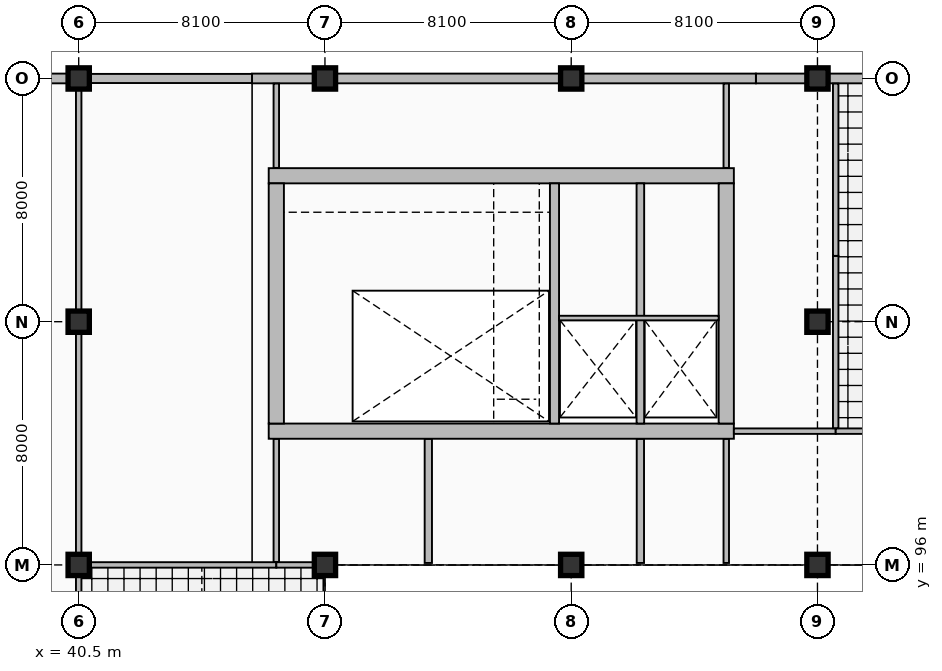
"""IFC4 building model, lengths in metres.
Left out: names, types, materials, properties, quantities, classifications, styles, units other than length and angle.
Written with IfcOpenShell. Run it as: python <this file> out.ifc"""

import sys

from ifc_helpers import new_model, si_unit, direction, frame, frame_2d, origin, origin_2d, place, context, subcontext, project, spatial, rectangle, extrude, element, fill, save


model = new_model("IFC4")
c1 = context("Model", 3, precision=1e-05, world=origin(), true_north=direction((0.0, 1.0)))
c2 = subcontext(c1, "Body", "Model", "MODEL_VIEW")
j1 = project(units=[si_unit("LENGTHUNIT", "METRE"), si_unit("PLANEANGLEUNIT", "RADIAN")], contexts=[c1])
p1 = place(None, origin())
s1 = spatial("IfcSite", under=j1, at=p1, CompositionType="ELEMENT")
p2 = place(p1, origin())
s2 = spatial("IfcBuilding", under=s1, at=p2, CompositionType="ELEMENT")
p3 = place(p2, frame((0.0, 0.0, 10.2)))
s3 = spatial("IfcBuildingStorey", under=s2, at=p3, CompositionType="ELEMENT", Elevation=10.2)
p4 = place(p3, frame((46.75, 100.4, 0.0), z_axis=(0.0, 0.0, 1.0), x_axis=(1.0, 0.0, 0.0)))
e1 = element("IfcWall", 1, at=p4, inside=s3, PredefinedType="SHEAR", context=c2, shape_type="SweptSolid", body=[
    extrude(rectangle(XDim=15.3, YDim=0.5, at=frame_2d((7.65, 0.0))), origin(), (0.0, 0.0, 1.0), 4.5),
])
p5 = place(p4, frame((1.0, 0.0, 0.0)))
e2 = element("IfcOpeningElement", 2, at=p5, cuts=e1, PredefinedType="OPENING", context=c2, shape_type="SweptSolid", body=[
    extrude(rectangle(XDim=1.15, YDim=2.25, at=frame_2d((0.575, 1.125))), frame((0.0, 0.26, 0.0), z_axis=(0.0, -1.0, 0.0), x_axis=(1.0, 0.0, 0.0)), (0.0, 0.0, 1.0), 0.52),
])
p6 = place(p4, frame((10.282, 0.0, 0.0)))
e3 = element("IfcOpeningElement", 3, at=p6, cuts=e1, PredefinedType="OPENING", context=c2, shape_type="SweptSolid", body=[
    extrude(rectangle(XDim=1.1, YDim=2.2, at=frame_2d((0.55, 1.1))), frame((0.0, 0.26, 0.0), z_axis=(0.0, -1.0, 0.0), x_axis=(1.0, 0.0, 0.0)), (0.0, 0.0, 1.0), 0.52),
])
p7 = place(p4, frame((12.998, 0.0, 0.0)))
e4 = element("IfcOpeningElement", 4, at=p7, cuts=e1, PredefinedType="OPENING", context=c2, shape_type="SweptSolid", body=[
    extrude(rectangle(XDim=1.1, YDim=2.2, at=frame_2d((0.55, 1.1))), frame((0.0, 0.26, 0.0), z_axis=(0.0, -1.0, 0.0), x_axis=(1.0, 0.0, 0.0)), (0.0, 0.0, 1.0), 0.52),
])
p8 = place(p3, frame((46.75, 108.8, 0.0), z_axis=(0.0, 0.0, 1.0), x_axis=(1.0, 0.0, 0.0)))
e5 = element("IfcWall", 5, at=p8, inside=s3, PredefinedType="SHEAR", context=c2, shape_type="SweptSolid", body=[
    extrude(rectangle(XDim=15.3, YDim=0.5, at=frame_2d((7.65, 0.0))), origin(), (0.0, 0.0, 1.0), 4.5),
])
for number, where, z_axis, x_axis in (
    (6, (47.0, 100.65, 0.0), (0.0, 0.0, 1.0), (0.0, 1.0, 0.0)),
    (7, (61.8, 100.65, 0.0), (0.0, 0.0, 1.0), (0.0, 1.0, 0.0)),
):
    element("IfcWall", number, at=place(p3, frame(where, z_axis=z_axis, x_axis=x_axis)), inside=s3, PredefinedType="SHEAR", context=c2, shape_type="SweptSolid", body=[
        extrude(rectangle(XDim=7.9, YDim=0.5, at=frame_2d((3.95, 0.0))), origin(), (0.0, 0.0, 1.0), 4.5),
    ])
p9 = place(p3, frame((56.15, 100.65, 0.0), z_axis=(0.0, 0.0, 1.0), x_axis=(0.0, 1.0, 0.0)))
e8 = element("IfcWall", 8, at=p9, inside=s3, PredefinedType="SHEAR", context=c2, shape_type="SweptSolid", body=[
    extrude(rectangle(XDim=7.9, YDim=0.3, at=frame_2d((3.95, 0.0))), origin(), (0.0, 0.0, 1.0), 4.5),
])
p10 = place(p3, frame((58.975, 100.65, 0.0), z_axis=(0.0, 0.0, 1.0), x_axis=(0.0, 1.0, 0.0)))
e9 = element("IfcWall", 9, at=p10, inside=s3, PredefinedType="SHEAR", context=c2, shape_type="SweptSolid", body=[
    extrude(rectangle(XDim=7.9, YDim=0.25, at=frame_2d((3.95, 0.0))), origin(), (0.0, 0.0, 1.0), 4.5),
])
for number, where, z_axis, x_axis in (
    (10, (40.5, 96.0, 0.0), (0.0, 0.0, 1.0), (1.0, 0.0, 0.0)),
    (11, (40.5, 104.0, 0.0), (0.0, 0.0, 1.0), (1.0, 0.0, 0.0)),
    (12, (40.5, 112.0, 0.0), (0.0, 0.0, 1.0), (1.0, 0.0, 0.0)),
    (13, (48.6, 96.0, 0.0), (0.0, 0.0, 1.0), (1.0, 0.0, 0.0)),
    (14, (48.6, 112.0, 0.0), (0.0, 0.0, 1.0), (1.0, 0.0, 0.0)),
    (15, (56.7, 96.0, 0.0), (0.0, 0.0, 1.0), (1.0, 0.0, 0.0)),
    (16, (56.7, 112.0, 0.0), (0.0, 0.0, 1.0), (1.0, 0.0, 0.0)),
    (17, (64.8, 96.0, 0.0), (0.0, 0.0, 1.0), (1.0, 0.0, 0.0)),
    (18, (64.8, 104.0, 0.0), (0.0, 0.0, 1.0), (1.0, 0.0, 0.0)),
    (19, (64.8, 112.0, 0.0), (0.0, 0.0, 1.0), (1.0, 0.0, 0.0)),
):
    element("IfcColumn", number, at=place(p3, frame(where, z_axis=z_axis, x_axis=x_axis)), inside=s3, PredefinedType="COLUMN", context=c2, shape_type="SweptSolid", body=[
        extrude(rectangle(XDim=0.7, YDim=0.7, at=origin_2d()), origin(), (0.0, 0.0, 1.0), 4.5),
    ])
p11 = place(p3, frame((76.95, 112.0, 0.0), z_axis=(0.0, 0.0, 1.0), x_axis=(-1.0, 0.0, 0.0)))
e20 = element("IfcWall", 20, at=p11, inside=s3, PredefinedType="SOLIDWALL", context=c2, shape_type="SweptSolid", body=[
    extrude(rectangle(XDim=14.175, YDim=0.32, at=frame_2d((7.087, 0.0))), origin(), (0.0, 0.0, 1.0), 3.632),
])
p12 = place(p11, frame((6.75, 0.0, 0.85)))
e21 = element("IfcOpeningElement", 21, at=p12, cuts=e20, PredefinedType="OPENING", context=c2, shape_type="SweptSolid", body=[
    extrude(rectangle(XDim=0.9, YDim=2.4, at=frame_2d((0.45, 1.2))), frame((0.0, 0.17, 0.0), z_axis=(0.0, -1.0, 0.0), x_axis=(1.0, 0.0, 0.0)), (0.0, 0.0, 1.0), 0.34),
])
p13 = place(p3, frame((62.775, 112.0, 0.0), z_axis=(0.0, 0.0, 1.0), x_axis=(-1.0, 0.0, 0.0)))
e22 = element("IfcWall", 22, at=p13, inside=s3, PredefinedType="SOLIDWALL", context=c2, shape_type="SweptSolid", body=[
    extrude(rectangle(XDim=14.175, YDim=0.32, at=frame_2d((7.087, 0.0))), origin(), (0.0, 0.0, 1.0), 3.632),
])
p14 = place(p13, frame((8.55, 0.0, 0.95)))
e23 = element("IfcOpeningElement", 23, at=p14, cuts=e22, PredefinedType="OPENING", context=c2, shape_type="SweptSolid", body=[
    extrude(rectangle(XDim=1.2, YDim=1.8, at=frame_2d((0.6, 0.9))), frame((0.0, 0.17, 0.0), z_axis=(0.0, -1.0, 0.0), x_axis=(1.0, 0.0, 0.0)), (0.0, 0.0, 1.0), 0.34),
])
p15 = place(p3, frame((48.6, 112.0, 0.0), z_axis=(0.0, 0.0, 1.0), x_axis=(-1.0, 0.0, 0.0)))
e24 = element("IfcWall", 24, at=p15, inside=s3, PredefinedType="SOLIDWALL", context=c2, shape_type="SweptSolid", body=[
    extrude(rectangle(XDim=2.4, YDim=0.32, at=frame_2d((1.2, 0.0))), origin(), (0.0, 0.0, 1.0), 3.699),
])
p16 = place(p3, frame((46.2, 112.0, 0.0), z_axis=(0.0, 0.0, 1.0), x_axis=(-1.0, 0.0, 0.0)))
e25 = element("IfcWall", 25, at=p16, inside=s3, PredefinedType="SOLIDWALL", context=c2, shape_type="SweptSolid", body=[
    extrude(rectangle(XDim=5.7, YDim=0.3, at=frame_2d((2.85, 0.0))), origin(), (0.0, 0.0, 1.0), 3.699),
])
p17 = place(p16, frame((2.25, 0.0, 0.95)))
e26 = element("IfcOpeningElement", 26, at=p17, cuts=e25, PredefinedType="OPENING", context=c2, shape_type="SweptSolid", body=[
    extrude(rectangle(XDim=1.35, YDim=1.8, at=frame_2d((0.675, 0.9))), frame((0.0, 0.16, 0.0), z_axis=(0.0, -1.0, 0.0), x_axis=(1.0, 0.0, 0.0)), (0.0, 0.0, 1.0), 0.32),
])
p18 = place(p3, frame((40.5, 112.0, 0.0), z_axis=(0.0, 0.0, 1.0), x_axis=(-1.0, 0.0, 0.0)))
e27 = element("IfcWall", 27, at=p18, inside=s3, PredefinedType="SOLIDWALL", context=c2, shape_type="SweptSolid", body=[
    extrude(rectangle(XDim=12.15, YDim=0.32, at=frame_2d((6.075, 0.0))), origin(), (0.0, 0.0, 1.0), 3.632),
])
p19 = place(p18, frame((5.4, 0.0, 0.85)))
e28 = element("IfcOpeningElement", 28, at=p19, cuts=e27, PredefinedType="OPENING", context=c2, shape_type="SweptSolid", body=[
    extrude(rectangle(XDim=1.35, YDim=2.1, at=frame_2d((0.675, 1.05))), frame((0.0, 0.17, 0.0), z_axis=(0.0, -1.0, 0.0), x_axis=(1.0, 0.0, 0.0)), (0.0, 0.0, 1.0), 0.34),
])
p20 = place(p3, frame((56.3, 104.12, 0.0), z_axis=(0.0, 0.0, 1.0), x_axis=(1.0, 0.0, 0.0)))
e29 = element("IfcWall", 29, at=p20, inside=s3, PredefinedType="PARTITIONING", context=c2, shape_type="SweptSolid", body=[
    extrude(rectangle(XDim=5.25, YDim=0.15, at=frame_2d((2.625, 0.0))), origin(), (0.0, 0.0, 1.0), 4.24),
])
p21 = place(p3, frame((40.858, 96.0, 0.0), z_axis=(0.0, 0.0, 1.0), x_axis=(1.0, 0.0, 0.0)))
e30 = element("IfcWall", 30, at=p21, inside=s3, PredefinedType="PARTITIONING", context=c2, shape_type="SweptSolid", body=[
    extrude(rectangle(XDim=6.142, YDim=0.18, at=frame_2d((3.071, 0.0))), origin(), (0.0, 0.0, 1.0), 3.632),
])
p22 = place(p3, frame((47.0, 96.0, 0.0), z_axis=(0.0, 0.0, 1.0), x_axis=(1.0, 0.0, 0.0)))
e31 = element("IfcWall", 31, at=p22, inside=s3, PredefinedType="PARTITIONING", context=c2, shape_type="SweptSolid", body=[
    extrude(rectangle(XDim=1.242, YDim=0.18, at=frame_2d((0.621, 0.0))), origin(), (0.0, 0.0, 1.0), 3.632),
])
p23 = place(p3, frame((62.05, 100.4, 0.0), z_axis=(0.0, 0.0, 1.0), x_axis=(1.0, 0.0, 0.0)))
e32 = element("IfcWall", 32, at=p23, inside=s3, PredefinedType="PARTITIONING", context=c2, shape_type="SweptSolid", body=[
    extrude(rectangle(XDim=3.35, YDim=0.18, at=frame_2d((1.675, 0.0))), origin(), (0.0, 0.0, 1.0), 4.24),
])
p24 = place(p23, frame((1.075, 0.0, 0.0)))
e33 = element("IfcOpeningElement", 33, at=p24, cuts=e32, PredefinedType="OPENING", context=c2, shape_type="SweptSolid", body=[
    extrude(rectangle(XDim=1.2, YDim=2.2, at=frame_2d((0.6, 1.1))), frame((0.0, 0.1, 0.0), z_axis=(0.0, -1.0, 0.0), x_axis=(1.0, 0.0, 0.0)), (0.0, 0.0, 1.0), 0.2),
])
p25 = place(p3, frame((65.4, 100.4, 0.0), z_axis=(0.0, 0.0, 1.0), x_axis=(1.0, 0.0, 0.0)))
e34 = element("IfcWall", 34, at=p25, inside=s3, PredefinedType="PARTITIONING", context=c2, shape_type="SweptSolid", body=[
    extrude(rectangle(XDim=19.1, YDim=0.18, at=frame_2d((9.55, 0.0))), origin(), (0.0, 0.0, 1.0), 4.24),
])
p26 = place(p25, frame((8.95, 0.0, 0.0)))
e35 = element("IfcOpeningElement", 35, at=p26, cuts=e34, PredefinedType="OPENING", context=c2, shape_type="SweptSolid", body=[
    extrude(rectangle(XDim=1.2, YDim=2.3, at=frame_2d((0.6, 1.15))), frame((0.0, 0.1, 0.0), z_axis=(0.0, -1.0, 0.0), x_axis=(1.0, 0.0, 0.0)), (0.0, 0.0, 1.0), 0.2),
])
p27 = place(p3, frame((40.5, 88.358, 0.0), z_axis=(0.0, 0.0, 1.0), x_axis=(0.0, 1.0, 0.0)))
e36 = element("IfcWall", 36, at=p27, inside=s3, PredefinedType="PARTITIONING", context=c2, shape_type="SweptSolid", body=[
    extrude(rectangle(XDim=7.284, YDim=0.18, at=frame_2d((3.642, 0.0))), origin(), (0.0, 0.0, 1.0), 3.732),
])
p28 = place(p27, frame((3.092, 0.0, 0.0)))
e37 = element("IfcOpeningElement", 37, at=p28, cuts=e36, PredefinedType="OPENING", context=c2, shape_type="SweptSolid", body=[
    extrude(rectangle(XDim=1.1, YDim=2.2, at=frame_2d((0.55, 1.1))), frame((0.0, 0.1, 0.0), z_axis=(0.0, -1.0, 0.0), x_axis=(1.0, 0.0, 0.0)), (0.0, 0.0, 1.0), 0.2),
])
p29 = place(p3, frame((40.5, 96.358, 0.0), z_axis=(0.0, 0.0, 1.0), x_axis=(0.0, 1.0, 0.0)))
e38 = element("IfcWall", 38, at=p29, inside=s3, PredefinedType="PARTITIONING", context=c2, shape_type="SweptSolid", body=[
    extrude(rectangle(XDim=7.284, YDim=0.18, at=frame_2d((3.642, 0.0))), origin(), (0.0, 0.0, 1.0), 3.769),
])
p30 = place(p29, frame((3.042, 0.0, 0.0)))
e39 = element("IfcOpeningElement", 39, at=p30, cuts=e38, PredefinedType="OPENING", context=c2, shape_type="SweptSolid", body=[
    extrude(rectangle(XDim=1.2, YDim=2.2, at=frame_2d((0.6, 1.1))), frame((0.0, 0.1, 0.0), z_axis=(0.0, -1.0, 0.0), x_axis=(1.0, 0.0, 0.0)), (0.0, 0.0, 1.0), 0.2),
])
p31 = place(p3, frame((40.5, 104.358, 0.0), z_axis=(0.0, 0.0, 1.0), x_axis=(0.0, 1.0, 0.0)))
e40 = element("IfcWall", 40, at=p31, inside=s3, PredefinedType="PARTITIONING", context=c2, shape_type="SweptSolid", body=[
    extrude(rectangle(XDim=7.284, YDim=0.18, at=frame_2d((3.642, 0.0))), origin(), (0.0, 0.0, 1.0), 3.769),
])
p32 = place(p3, frame((47.0, 96.098, 0.0), z_axis=(0.0, 0.0, 1.0), x_axis=(0.0, 1.0, 0.0)))
e41 = element("IfcWall", 41, at=p32, inside=s3, PredefinedType="PARTITIONING", context=c2, shape_type="SweptSolid", body=[
    extrude(rectangle(XDim=4.044, YDim=0.18, at=frame_2d((2.022, 0.0))), origin(), (0.0, 0.0, 1.0), 4.24),
])
p33 = place(p32, frame((1.472, 0.0, 0.0)))
e42 = element("IfcOpeningElement", 42, at=p33, cuts=e41, PredefinedType="OPENING", context=c2, shape_type="SweptSolid", body=[
    extrude(rectangle(XDim=1.1, YDim=2.2, at=frame_2d((0.55, 1.1))), frame((0.0, 0.1, 0.0), z_axis=(0.0, -1.0, 0.0), x_axis=(1.0, 0.0, 0.0)), (0.0, 0.0, 1.0), 0.2),
])
p34 = place(p3, frame((47.0, 109.058, 0.0), z_axis=(0.0, 0.0, 1.0), x_axis=(0.0, 1.0, 0.0)))
e43 = element("IfcWall", 43, at=p34, inside=s3, PredefinedType="PARTITIONING", context=c2, shape_type="SweptSolid", body=[
    extrude(rectangle(XDim=2.774, YDim=0.18, at=frame_2d((1.387, 0.0))), origin(), (0.0, 0.0, 1.0), 4.24),
])
p35 = place(p34, frame((0.837, 0.0, 0.0)))
e44 = element("IfcOpeningElement", 44, at=p35, cuts=e43, PredefinedType="OPENING", context=c2, shape_type="SweptSolid", body=[
    extrude(rectangle(XDim=1.1, YDim=2.2, at=frame_2d((0.55, 1.1))), frame((0.0, 0.1, 0.0), z_axis=(0.0, -1.0, 0.0), x_axis=(1.0, 0.0, 0.0)), (0.0, 0.0, 1.0), 0.2),
])
p36 = place(p3, frame((52.0, 96.065, 0.0), z_axis=(0.0, 0.0, 1.0), x_axis=(0.0, 1.0, 0.0)))
e45 = element("IfcWall", 45, at=p36, inside=s3, PredefinedType="PARTITIONING", context=c2, shape_type="SweptSolid", body=[
    extrude(rectangle(XDim=4.077, YDim=0.24, at=frame_2d((2.039, 0.0))), origin(), (0.0, 0.0, 1.0), 4.24),
])
p37 = place(p36, frame((1.438, 0.0, 0.0)))
e46 = element("IfcOpeningElement", 46, at=p37, cuts=e45, PredefinedType="OPENING", context=c2, shape_type="SweptSolid", body=[
    extrude(rectangle(XDim=1.2, YDim=2.3, at=frame_2d((0.6, 1.15))), frame((0.0, 0.13, 0.0), z_axis=(0.0, -1.0, 0.0), x_axis=(1.0, 0.0, 0.0)), (0.0, 0.0, 1.0), 0.26),
])
p38 = place(p3, frame((58.975, 96.065, 0.0), z_axis=(0.0, 0.0, 1.0), x_axis=(0.0, 1.0, 0.0)))
e47 = element("IfcWall", 47, at=p38, inside=s3, PredefinedType="PARTITIONING", context=c2, shape_type="SweptSolid", body=[
    extrude(rectangle(XDim=4.077, YDim=0.24, at=frame_2d((2.039, 0.0))), origin(), (0.0, 0.0, 1.0), 4.24),
])
p39 = place(p3, frame((61.8, 96.065, 0.0), z_axis=(0.0, 0.0, 1.0), x_axis=(0.0, 1.0, 0.0)))
e48 = element("IfcWall", 48, at=p39, inside=s3, PredefinedType="PARTITIONING", context=c2, shape_type="SweptSolid", body=[
    extrude(rectangle(XDim=4.077, YDim=0.18, at=frame_2d((2.039, 0.0))), origin(), (0.0, 0.0, 1.0), 4.24),
])
p40 = place(p39, frame((1.489, 0.0, 0.0)))
e49 = element("IfcOpeningElement", 49, at=p40, cuts=e48, PredefinedType="OPENING", context=c2, shape_type="SweptSolid", body=[
    extrude(rectangle(XDim=1.1, YDim=2.2, at=frame_2d((0.55, 1.1))), frame((0.0, 0.1, 0.0), z_axis=(0.0, -1.0, 0.0), x_axis=(1.0, 0.0, 0.0)), (0.0, 0.0, 1.0), 0.2),
])
p41 = place(p3, frame((61.8, 109.058, 0.0), z_axis=(0.0, 0.0, 1.0), x_axis=(0.0, 1.0, 0.0)))
e50 = element("IfcWall", 50, at=p41, inside=s3, PredefinedType="PARTITIONING", context=c2, shape_type="SweptSolid", body=[
    extrude(rectangle(XDim=2.774, YDim=0.18, at=frame_2d((1.387, 0.0))), origin(), (0.0, 0.0, 1.0), 4.24),
])
p42 = place(p41, frame((0.837, 0.0, 0.0)))
e51 = element("IfcOpeningElement", 51, at=p42, cuts=e50, PredefinedType="OPENING", context=c2, shape_type="SweptSolid", body=[
    extrude(rectangle(XDim=1.1, YDim=2.2, at=frame_2d((0.55, 1.1))), frame((0.0, 0.1, 0.0), z_axis=(0.0, -1.0, 0.0), x_axis=(1.0, 0.0, 0.0)), (0.0, 0.0, 1.0), 0.2),
])
for number, where, z_axis, x_axis in (
    (52, (65.4, 100.498, 0.0), (0.0, 0.0, 1.0), (0.0, 1.0, 0.0)),
    (53, (65.4, 106.165, 0.0), (0.0, 0.0, 1.0), (0.0, 1.0, 0.0)),
):
    element("IfcWall", number, at=place(p3, frame(where, z_axis=z_axis, x_axis=x_axis)), inside=s3, PredefinedType="PARTITIONING", context=c2, shape_type="SweptSolid", body=[
        extrude(rectangle(XDim=5.667, YDim=0.18, at=frame_2d((2.833, 0.0))), origin(), (0.0, 0.0, 1.0), 4.24),
    ])
p43 = place(p14, origin())
e54 = element("IfcWindow", 54, at=p43, inside=s3, PartitioningType="SINGLE_PANEL", PredefinedType="WINDOW", context=c2, shape_type="SweptSolid", body=[
    extrude(rectangle(XDim=1.2, YDim=1.8, at=frame_2d((0.6, 0.9))), frame((0.0, 0.03, 0.0), z_axis=(0.0, -1.0, 0.0), x_axis=(1.0, 0.0, 0.0)), (0.0, 0.0, 1.0), 0.06),
])
fill(e23, e54)
p44 = place(p17, origin())
e55 = element("IfcWindow", 55, at=p44, inside=s3, PartitioningType="DOUBLE_PANEL_VERTICAL", PredefinedType="WINDOW", context=c2, shape_type="SweptSolid", body=[
    extrude(rectangle(XDim=1.35, YDim=1.8, at=frame_2d((0.675, 0.9))), frame((0.0, 0.03, 0.0), z_axis=(0.0, -1.0, 0.0), x_axis=(1.0, 0.0, 0.0)), (0.0, 0.0, 1.0), 0.06),
])
fill(e26, e55)
p45 = place(p5, origin())
e56 = element("IfcDoor", 56, at=p45, inside=s3, OperationType="SINGLE_SWING_RIGHT", PredefinedType="DOOR", context=c2, shape_type="SweptSolid", body=[
    extrude(rectangle(XDim=1.15, YDim=2.25, at=frame_2d((0.575, 1.125))), frame((0.0, 0.025, 0.0), z_axis=(0.0, -1.0, 0.0), x_axis=(1.0, 0.0, 0.0)), (0.0, 0.0, 1.0), 0.05),
])
fill(e2, e56)
p46 = place(p6, frame((1.1, 0.0, 0.0), z_axis=(0.0, 0.0, 1.0), x_axis=(-1.0, 0.0, 0.0)))
e57 = element("IfcDoor", 57, at=p46, inside=s3, OperationType="DOUBLE_DOOR_SLIDING", PredefinedType="DOOR", context=c2, shape_type="SweptSolid", body=[
    extrude(rectangle(XDim=1.1, YDim=2.2, at=frame_2d((0.55, 1.1))), frame((0.0, 0.025, 0.0), z_axis=(0.0, -1.0, 0.0), x_axis=(1.0, 0.0, 0.0)), (0.0, 0.0, 1.0), 0.05),
])
fill(e3, e57)
p47 = place(p7, frame((1.1, 0.0, 0.0), z_axis=(0.0, 0.0, 1.0), x_axis=(-1.0, 0.0, 0.0)))
e58 = element("IfcDoor", 58, at=p47, inside=s3, OperationType="DOUBLE_DOOR_SLIDING", PredefinedType="DOOR", context=c2, shape_type="SweptSolid", body=[
    extrude(rectangle(XDim=1.1, YDim=2.2, at=frame_2d((0.55, 1.1))), frame((0.0, 0.025, 0.0), z_axis=(0.0, -1.0, 0.0), x_axis=(1.0, 0.0, 0.0)), (0.0, 0.0, 1.0), 0.05),
])
fill(e4, e58)
p48 = place(p24, frame((1.2, 0.0, 0.0), z_axis=(0.0, 0.0, 1.0), x_axis=(-1.0, 0.0, 0.0)))
e59 = element("IfcDoor", 59, at=p48, inside=s3, OperationType="SINGLE_SWING_LEFT", PredefinedType="DOOR", context=c2, shape_type="SweptSolid", body=[
    extrude(rectangle(XDim=1.2, YDim=2.2, at=frame_2d((0.6, 1.1))), frame((0.0, 0.025, 0.0), z_axis=(0.0, -1.0, 0.0), x_axis=(1.0, 0.0, 0.0)), (0.0, 0.0, 1.0), 0.05),
])
fill(e33, e59)
p49 = place(p30, frame((1.2, 0.0, 0.0), z_axis=(0.0, 0.0, 1.0), x_axis=(-1.0, 0.0, 0.0)))
e60 = element("IfcDoor", 60, at=p49, inside=s3, OperationType="SINGLE_SWING_LEFT", PredefinedType="DOOR", context=c2, shape_type="SweptSolid", body=[
    extrude(rectangle(XDim=1.2, YDim=2.2, at=frame_2d((0.6, 1.1))), frame((0.0, 0.025, 0.0), z_axis=(0.0, -1.0, 0.0), x_axis=(1.0, 0.0, 0.0)), (0.0, 0.0, 1.0), 0.05),
])
fill(e39, e60)
p50 = place(p33, origin())
e61 = element("IfcDoor", 61, at=p50, inside=s3, OperationType="SINGLE_SWING_RIGHT", PredefinedType="DOOR", context=c2, shape_type="SweptSolid", body=[
    extrude(rectangle(XDim=1.1, YDim=2.2, at=frame_2d((0.55, 1.1))), frame((0.0, 0.025, 0.0), z_axis=(0.0, -1.0, 0.0), x_axis=(1.0, 0.0, 0.0)), (0.0, 0.0, 1.0), 0.05),
])
fill(e42, e61)
p51 = place(p35, frame((1.1, 0.0, 0.0), z_axis=(0.0, 0.0, 1.0), x_axis=(-1.0, 0.0, 0.0)))
e62 = element("IfcDoor", 62, at=p51, inside=s3, OperationType="SINGLE_SWING_LEFT", PredefinedType="DOOR", context=c2, shape_type="SweptSolid", body=[
    extrude(rectangle(XDim=1.1, YDim=2.2, at=frame_2d((0.55, 1.1))), frame((0.0, 0.025, 0.0), z_axis=(0.0, -1.0, 0.0), x_axis=(1.0, 0.0, 0.0)), (0.0, 0.0, 1.0), 0.05),
])
fill(e44, e62)
p52 = place(p37, origin())
e63 = element("IfcDoor", 63, at=p52, inside=s3, OperationType="SINGLE_SWING_RIGHT", PredefinedType="DOOR", context=c2, shape_type="SweptSolid", body=[
    extrude(rectangle(XDim=1.2, YDim=2.3, at=frame_2d((0.6, 1.15))), frame((0.0, 0.025, 0.0), z_axis=(0.0, -1.0, 0.0), x_axis=(1.0, 0.0, 0.0)), (0.0, 0.0, 1.0), 0.05),
])
fill(e46, e63)
p53 = place(p40, frame((1.1, 0.0, 0.0), z_axis=(0.0, 0.0, 1.0), x_axis=(-1.0, 0.0, 0.0)))
e64 = element("IfcDoor", 64, at=p53, inside=s3, OperationType="SINGLE_SWING_LEFT", PredefinedType="DOOR", context=c2, shape_type="SweptSolid", body=[
    extrude(rectangle(XDim=1.1, YDim=2.2, at=frame_2d((0.55, 1.1))), frame((0.0, 0.025, 0.0), z_axis=(0.0, -1.0, 0.0), x_axis=(1.0, 0.0, 0.0)), (0.0, 0.0, 1.0), 0.05),
])
fill(e49, e64)
p54 = place(p42, origin())
e65 = element("IfcDoor", 65, at=p54, inside=s3, OperationType="SINGLE_SWING_RIGHT", PredefinedType="DOOR", context=c2, shape_type="SweptSolid", body=[
    extrude(rectangle(XDim=1.1, YDim=2.2, at=frame_2d((0.55, 1.1))), frame((0.0, 0.025, 0.0), z_axis=(0.0, -1.0, 0.0), x_axis=(1.0, 0.0, 0.0)), (0.0, 0.0, 1.0), 0.05),
])
fill(e51, e65)
save(model, sys.argv[1])
